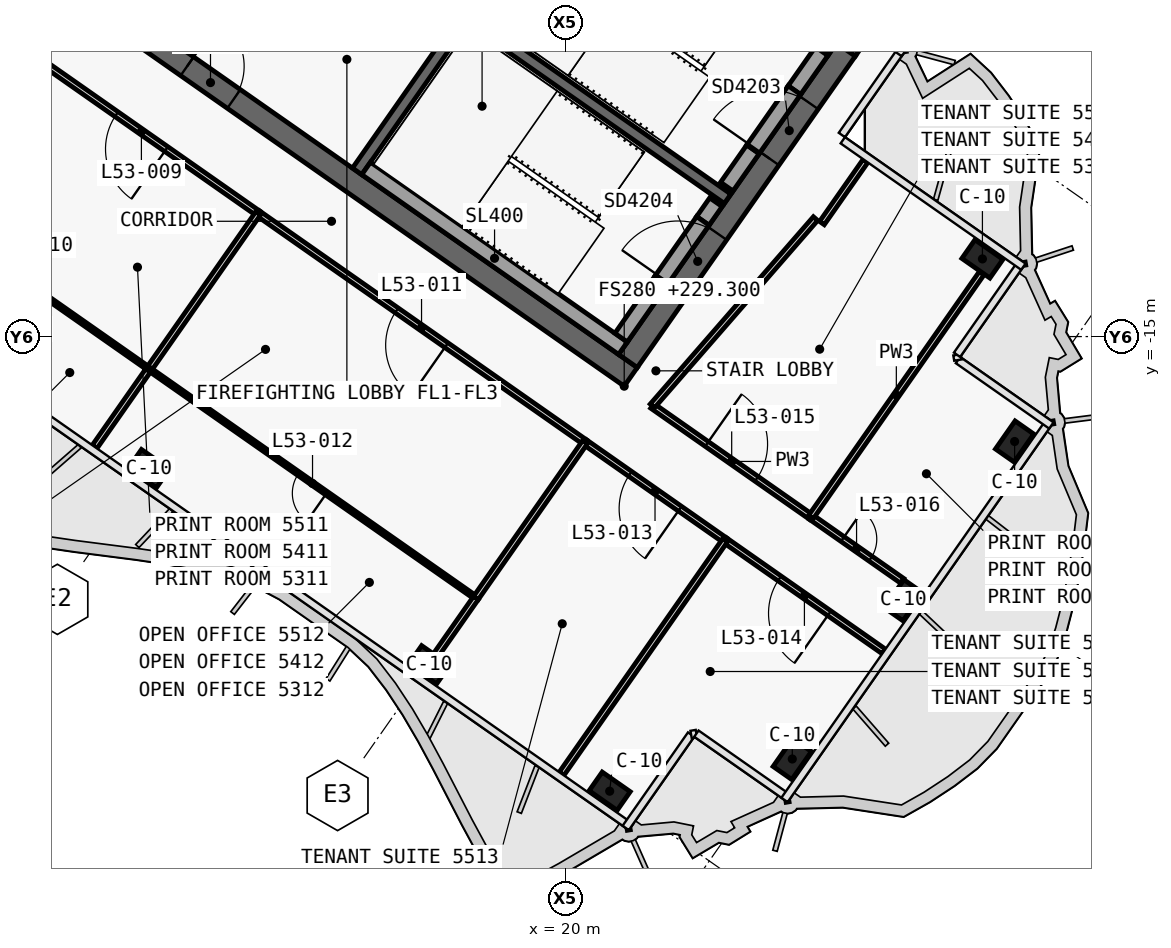
"""IFC4 building model, lengths in metres.
Left out: names, types, materials, properties, quantities, classifications, styles, units other than length and angle.
Written with IfcOpenShell. Run it as: python <this file> out.ifc"""

import sys

from ifc_helpers import new_model, si_unit, direction, frame, frame_2d, origin, origin_2d, place, context, subcontext, project, spatial, polyline, rectangle, outline, extrude, element, fill, save


model = new_model("IFC4")
c1 = context("Model", 3, precision=1e-05, world=origin(), true_north=direction((0.0, 1.0)))
c2 = subcontext(c1, "Body", "Model", "MODEL_VIEW")
j1 = project(units=[si_unit("LENGTHUNIT", "METRE"), si_unit("PLANEANGLEUNIT", "RADIAN")], contexts=[c1])
p1 = place(None, origin())
s1 = spatial("IfcSite", under=j1, at=p1, CompositionType="ELEMENT")
p2 = place(p1, origin())
s2 = spatial("IfcBuilding", under=s1, at=p2, CompositionType="ELEMENT")
p3 = place(p2, frame((0.0, 0.0, 229.3)))
s3 = spatial("IfcBuildingStorey", under=s2, at=p3, CompositionType="ELEMENT", Elevation=229.3)
p4 = place(p3, frame((0.028, 12.066, 0.0), z_axis=(0.0, 0.0, 1.0), x_axis=(0.819151382952, -0.573577380837, 0.0)))
e1 = element("IfcWall", 1, at=p4, inside=s3, PredefinedType="SHEAR", context=c2, shape_type="SweptSolid", body=[
    extrude(outline(polyline([(33.898, 0.3), (0.0, 0.3), (0.42, -0.3), (33.898, -0.3), (33.898, 0.3)])), origin(), (0.0, 0.0, 1.0), 3.9),
])
p5 = place(p3, frame((0.028, -0.874, 0.0), z_axis=(0.0, 0.0, 1.0), x_axis=(0.819150035022, -0.573579305871, 0.0)))
e2 = element("IfcWall", 2, at=p5, inside=s3, PredefinedType="SHEAR", context=c2, shape_type="SweptSolid", body=[
    extrude(outline(polyline([(26.476, 0.3), (0.0, 0.3), (0.42, -0.3), (26.476, -0.3), (26.476, 0.3)])), origin(), (0.0, 0.0, 1.0), 3.9),
])
p6 = place(p5, frame((1.026, 0.0, 0.0)))
e3 = element("IfcOpeningElement", 3, at=p6, cuts=e2, PredefinedType="OPENING", context=c2, shape_type="SweptSolid", body=[
    extrude(rectangle(XDim=1.5, YDim=2.1, at=frame_2d((0.75, 1.05))), frame((0.0, 0.31, 0.0), z_axis=(0.0, -1.0, 0.0), x_axis=(1.0, 0.0, 0.0)), (0.0, 0.0, 1.0), 0.62),
])
p7 = place(p5, frame((12.226, 0.0, 0.0)))
e4 = element("IfcOpeningElement", 4, at=p7, cuts=e2, PredefinedType="OPENING", context=c2, shape_type="SweptSolid", body=[
    extrude(rectangle(XDim=1.5, YDim=2.1, at=frame_2d((0.75, 1.05))), frame((0.0, 0.31, 0.0), z_axis=(0.0, -1.0, 0.0), x_axis=(1.0, 0.0, 0.0)), (0.0, 0.0, 1.0), 0.62),
])
p8 = place(p3, frame((21.642, -15.642, 0.0), z_axis=(0.0, 0.0, 1.0), x_axis=(0.573586866468, 0.819144740944, 0.0)))
e5 = element("IfcWall", 5, at=p8, inside=s3, PredefinedType="SHEAR", context=c2, shape_type="SweptSolid", body=[
    extrude(outline(polyline([(10.0, 0.3), (0.0, 0.3), (0.0, -0.3), (10.0, -0.3), (10.0, 0.3)])), origin(), (0.0, 0.0, 1.0), 3.9),
])
p9 = place(p8, frame((6.5, 0.0, 0.0)))
e6 = element("IfcOpeningElement", 6, at=p9, cuts=e5, PredefinedType="OPENING", context=c2, shape_type="SweptSolid", body=[
    extrude(rectangle(XDim=1.8, YDim=2.1, at=frame_2d((0.9, 1.05))), frame((0.0, 0.31, 0.0), z_axis=(0.0, -1.0, 0.0), x_axis=(1.0, 0.0, 0.0)), (0.0, 0.0, 1.0), 0.62),
])
p10 = place(p8, frame((2.3, 0.0, 0.0)))
e7 = element("IfcOpeningElement", 7, at=p10, cuts=e5, PredefinedType="OPENING", context=c2, shape_type="SweptSolid", body=[
    extrude(rectangle(XDim=1.8, YDim=2.1, at=frame_2d((0.9, 1.05))), frame((0.0, 0.31, 0.0), z_axis=(0.0, -1.0, 0.0), x_axis=(1.0, 0.0, 0.0)), (0.0, 0.0, 1.0), 0.62),
])
p11 = place(p3, frame((14.515, -10.652, 0.0), z_axis=(0.0, 0.0, 1.0), x_axis=(0.573560315113, 0.819163332265, 0.0)))
e8 = element("IfcWall", 8, at=p11, inside=s3, PredefinedType="SHEAR", context=c2, shape_type="SweptSolid", body=[
    extrude(outline(polyline([(0.0, 0.15), (0.0, -0.15), (4.85, -0.15), (4.85, 0.15), (0.0, 0.15)])), origin(), (0.0, 0.0, 1.0), 3.9),
])
p12 = place(p3, frame((2.638, 3.768, 0.0), z_axis=(0.0, 0.0, 1.0), x_axis=(0.819155014212, -0.573572194837, 0.0)))
e9 = element("IfcWall", 9, at=p12, inside=s3, PredefinedType="SHEAR", context=c2, shape_type="SweptSolid", body=[
    extrude(outline(polyline([(0.0, 0.15), (0.0, -0.15), (26.4, -0.15), (26.4, 0.15), (0.0, 0.15)])), origin(), (0.0, 0.0, 1.0), 3.9),
])
p13 = place(p12, frame((9.637, 0.0, 0.0)))
e10 = element("IfcOpeningElement", 10, at=p13, cuts=e9, PredefinedType="OPENING", context=c2, shape_type="SweptSolid", body=[
    extrude(rectangle(XDim=1.2, YDim=2.1, at=frame_2d((0.6, 1.05))), frame((0.0, 0.16, 0.0), z_axis=(0.0, -1.0, 0.0), x_axis=(1.0, 0.0, 0.0)), (0.0, 0.0, 1.0), 0.32),
])
p14 = place(p12, frame((11.812, 0.0, 0.0)))
e11 = element("IfcOpeningElement", 11, at=p14, cuts=e9, PredefinedType="OPENING", context=c2, shape_type="SweptSolid", body=[
    extrude(rectangle(XDim=1.2, YDim=2.1, at=frame_2d((0.6, 1.05))), frame((0.0, 0.16, 0.0), z_axis=(0.0, -1.0, 0.0), x_axis=(1.0, 0.0, 0.0)), (0.0, 0.0, 1.0), 0.32),
])
p15 = place(p12, frame((13.988, 0.0, 0.0)))
e12 = element("IfcOpeningElement", 12, at=p15, cuts=e9, PredefinedType="OPENING", context=c2, shape_type="SweptSolid", body=[
    extrude(rectangle(XDim=1.2, YDim=2.1, at=frame_2d((0.6, 1.05))), frame((0.0, 0.16, 0.0), z_axis=(0.0, -1.0, 0.0), x_axis=(1.0, 0.0, 0.0)), (0.0, 0.0, 1.0), 0.32),
])
p16 = place(p12, frame((16.262, 0.0, 0.0)))
e13 = element("IfcOpeningElement", 13, at=p16, cuts=e9, PredefinedType="OPENING", context=c2, shape_type="SweptSolid", body=[
    extrude(rectangle(XDim=1.0, YDim=2.1, at=frame_2d((0.5, 1.05))), frame((0.0, 0.16, 0.0), z_axis=(0.0, -1.0, 0.0), x_axis=(1.0, 0.0, 0.0)), (0.0, 0.0, 1.0), 0.32),
])
for number, where, z_axis, x_axis in (
    (14, (9.038, -18.475, 0.0), (0.0, 0.0, 1.0), (0.819, -0.574, 0.0)),
    (15, (16.41, -23.637, 0.0), (0.0, 0.0, 1.0), (0.819, -0.574, 0.0)),
    (16, (21.161, -26.964, 0.0), (0.0, 0.0, 1.0), (0.819, -0.574, 0.0)),
    (17, (30.969, -12.956, 0.0), (0.0, 0.0, 1.0), (0.819, -0.574, 0.0)),
    (18, (25.966, -26.117, 0.0), (0.0, 0.0, 1.0), (0.574, 0.819, 0.0)),
    (19, (28.891, -21.939, 0.0), (0.0, 0.0, 1.0), (0.574, 0.819, 0.0)),
    (20, (31.816, -17.761, 0.0), (0.0, 0.0, 1.0), (0.574, 0.819, 0.0)),
):
    element("IfcColumn", number, at=place(p3, frame(where, z_axis=z_axis, x_axis=x_axis)), inside=s3, PredefinedType="COLUMN", context=c2, shape_type="SweptSolid", body=[
        extrude(rectangle(XDim=0.9, YDim=0.6, at=origin_2d()), origin(), (0.0, 0.0, 1.0), 3.9),
    ])
p17 = place(p3, frame((20.259, -2.71, 0.0), z_axis=(0.0, 0.0, 1.0), x_axis=(0.81914849389, -0.573581506813, 0.0)))
e21 = element("IfcWall", 21, at=p17, inside=s3, PredefinedType="SOLIDWALL", context=c2, shape_type="SweptSolid", body=[
    extrude(rectangle(XDim=8.25, YDim=0.4, at=frame_2d((4.125, 0.0))), origin(), (0.0, 0.0, 1.0), 3.62),
])
p18 = place(p3, frame((24.244, -11.055, 0.0), z_axis=(0.0, 0.0, 1.0), x_axis=(0.573571582932, 0.819155442668, 0.0)))
e22 = element("IfcWall", 22, at=p18, inside=s3, PredefinedType="SOLIDWALL", context=c2, shape_type="SweptSolid", body=[
    extrude(rectangle(XDim=1.2, YDim=0.4, at=frame_2d((0.6, 0.0))), origin(), (0.0, 0.0, 1.0), 3.62),
])
p19 = place(p3, frame((26.022, -8.515, 0.0), z_axis=(0.0, 0.0, 1.0), x_axis=(0.573619628835, 0.819121798889, 0.0)))
e23 = element("IfcWall", 23, at=p19, inside=s3, PredefinedType="SOLIDWALL", context=c2, shape_type="SweptSolid", body=[
    extrude(rectangle(XDim=1.25, YDim=0.4, at=frame_2d((0.625, 0.0))), origin(), (0.0, 0.0, 1.0), 3.62),
])
p20 = place(p3, frame((24.932, -10.072, 2.15), z_axis=(0.0, 0.0, 1.0), x_axis=(0.573591692345, 0.819141361715, 0.0)))
e24 = element("IfcWall", 24, at=p20, inside=s3, PredefinedType="SOLIDWALL", context=c2, shape_type="SweptSolid", body=[
    extrude(rectangle(XDim=1.9, YDim=0.4, at=frame_2d((0.95, 0.0))), origin(), (0.0, 0.0, 1.0), 1.47),
])
p21 = place(p3, frame((14.753, -10.574, 0.0), z_axis=(0.0, 0.0, 1.0), x_axis=(0.819158229677, -0.573567602601, 0.0)))
e25 = element("IfcWall", 25, at=p21, inside=s3, PredefinedType="SOLIDWALL", context=c2, shape_type="SweptSolid", body=[
    extrude(rectangle(XDim=8.25, YDim=0.4, at=frame_2d((4.125, 0.0))), origin(), (0.0, 0.0, 1.0), 3.62),
])
p22 = place(p3, frame((21.462, -15.028, 0.0), z_axis=(0.0, 0.0, 1.0), x_axis=(0.573559770908, 0.819163713305, 0.0)))
e26 = element("IfcWall", 26, at=p22, inside=s3, PredefinedType="SOLIDWALL", context=c2, shape_type="SweptSolid", body=[
    extrude(rectangle(XDim=1.85, YDim=0.4, at=frame_2d((0.925, 0.0))), origin(), (0.0, 0.0, 1.0), 3.62),
])
p23 = place(p3, frame((23.613, -11.956, 0.0), z_axis=(0.0, 0.0, 1.0), x_axis=(0.573435029941, 0.819251039936, 0.0)))
e27 = element("IfcWall", 27, at=p23, inside=s3, PredefinedType="SOLIDWALL", context=c2, shape_type="SweptSolid", body=[
    extrude(rectangle(XDim=0.6, YDim=0.4, at=frame_2d((0.3, 0.0))), origin(), (0.0, 0.0, 1.0), 3.62),
])
p24 = place(p3, frame((22.523, -13.512, 2.15), z_axis=(0.0, 0.0, 1.0), x_axis=(0.573591692345, 0.819141361715, 0.0)))
e28 = element("IfcWall", 28, at=p24, inside=s3, PredefinedType="SOLIDWALL", context=c2, shape_type="SweptSolid", body=[
    extrude(rectangle(XDim=1.9, YDim=0.4, at=frame_2d((0.95, 0.0))), origin(), (0.0, 0.0, 1.0), 1.47),
])
p25 = place(p3, frame((22.283, -16.824, 0.0), z_axis=(0.0, 0.0, 1.0), x_axis=(0.819171182807, -0.573549102744, 0.0)))
e29 = element("IfcWall", 29, at=p25, inside=s3, PredefinedType="PARTITIONING", context=c2, shape_type="SweptSolid", body=[
    extrude(rectangle(XDim=5.099, YDim=0.15, at=frame_2d((2.55, 0.0))), origin(), (0.0, 0.0, 1.0), 3.05),
])
p26 = place(p25, frame((1.75, 0.0, 0.0)))
e30 = element("IfcOpeningElement", 30, at=p26, cuts=e29, PredefinedType="OPENING", context=c2, shape_type="SweptSolid", body=[
    extrude(rectangle(XDim=1.6, YDim=2.1, at=frame_2d((0.8, 1.05))), frame((0.0, 0.085, 0.0), z_axis=(0.0, -1.0, 0.0), x_axis=(1.0, 0.0, 0.0)), (0.0, 0.0, 1.0), 0.17),
])
p27 = place(p3, frame((26.457, -19.746, 0.0), z_axis=(0.0, 0.0, 1.0), x_axis=(0.819177150809, -0.573540578855, 0.0)))
e31 = element("IfcWall", 31, at=p27, inside=s3, PredefinedType="PARTITIONING", context=c2, shape_type="SweptSolid", body=[
    extrude(rectangle(XDim=2.932, YDim=0.15, at=frame_2d((1.466, 0.0))), origin(), (0.0, 0.0, 1.0), 3.05),
])
p28 = place(p27, frame((1.016, 0.0, 0.0)))
e32 = element("IfcOpeningElement", 32, at=p28, cuts=e31, PredefinedType="OPENING", context=c2, shape_type="SweptSolid", body=[
    extrude(rectangle(XDim=0.9, YDim=2.1, at=frame_2d((0.45, 1.05))), frame((0.0, 0.085, 0.0), z_axis=(0.0, -1.0, 0.0), x_axis=(1.0, 0.0, 0.0)), (0.0, 0.0, 1.0), 0.17),
])
p29 = place(p3, frame((11.912, -11.759, 0.0), z_axis=(0.0, 0.0, 1.0), x_axis=(-0.819150881364, 0.573578097177, 0.0)))
e33 = element("IfcWall", 33, at=p29, inside=s3, PredefinedType="PARTITIONING", context=c2, shape_type="SweptSolid", body=[
    extrude(rectangle(XDim=7.502, YDim=0.15, at=frame_2d((3.751, 0.0))), origin(), (0.0, 0.0, 1.0), 3.05),
])
p30 = place(p29, frame((2.951, 0.0, 0.0)))
e34 = element("IfcOpeningElement", 34, at=p30, cuts=e33, PredefinedType="OPENING", context=c2, shape_type="SweptSolid", body=[
    extrude(rectangle(XDim=1.6, YDim=2.1, at=frame_2d((0.8, 1.05))), frame((0.0, 0.085, 0.0), z_axis=(0.0, -1.0, 0.0), x_axis=(1.0, 0.0, 0.0)), (0.0, 0.0, 1.0), 0.17),
])
p31 = place(p3, frame((20.513, -17.781, 0.0), z_axis=(0.0, 0.0, 1.0), x_axis=(-0.819156568366, 0.573569975245, 0.0)))
e35 = element("IfcWall", 35, at=p31, inside=s3, PredefinedType="PARTITIONING", context=c2, shape_type="SweptSolid", body=[
    extrude(rectangle(XDim=10.504, YDim=0.15, at=frame_2d((5.252, 0.0))), origin(), (0.0, 0.0, 1.0), 3.05),
])
p32 = place(p31, frame((4.452, 0.0, 0.0)))
e36 = element("IfcOpeningElement", 36, at=p32, cuts=e35, PredefinedType="OPENING", context=c2, shape_type="SweptSolid", body=[
    extrude(rectangle(XDim=1.6, YDim=2.1, at=frame_2d((0.8, 1.05))), frame((0.0, 0.085, 0.0), z_axis=(0.0, -1.0, 0.0), x_axis=(1.0, 0.0, 0.0)), (0.0, 0.0, 1.0), 0.17),
])
p33 = place(p3, frame((24.199, -20.362, 0.0), z_axis=(0.0, 0.0, 1.0), x_axis=(-0.819165703328, 0.573556928727, 0.0)))
e37 = element("IfcWall", 37, at=p33, inside=s3, PredefinedType="PARTITIONING", context=c2, shape_type="SweptSolid", body=[
    extrude(rectangle(XDim=4.504, YDim=0.15, at=frame_2d((2.252, 0.0))), origin(), (0.0, 0.0, 1.0), 3.05),
])
p34 = place(p33, frame((1.452, 0.0, 0.0)))
e38 = element("IfcOpeningElement", 38, at=p34, cuts=e37, PredefinedType="OPENING", context=c2, shape_type="SweptSolid", body=[
    extrude(rectangle(XDim=1.6, YDim=2.1, at=frame_2d((0.8, 1.05))), frame((0.0, 0.085, 0.0), z_axis=(0.0, -1.0, 0.0), x_axis=(1.0, 0.0, 0.0)), (0.0, 0.0, 1.0), 0.17),
])
p35 = place(p3, frame((28.375, -23.287, 0.0), z_axis=(0.0, 0.0, 1.0), x_axis=(-0.819132992492, 0.573603644176, 0.0)))
e39 = element("IfcWall", 39, at=p35, inside=s3, PredefinedType="PARTITIONING", context=c2, shape_type="SweptSolid", body=[
    extrude(rectangle(XDim=5.102, YDim=0.15, at=frame_2d((2.551, 0.0))), origin(), (0.0, 0.0, 1.0), 3.0),
])
p36 = place(p35, frame((1.751, 0.0, 0.0)))
e40 = element("IfcOpeningElement", 40, at=p36, cuts=e39, PredefinedType="OPENING", context=c2, shape_type="SweptSolid", body=[
    extrude(rectangle(XDim=1.6, YDim=2.1, at=frame_2d((0.8, 1.05))), frame((0.0, 0.085, 0.0), z_axis=(0.0, -1.0, 0.0), x_axis=(1.0, 0.0, 0.0)), (0.0, 0.0, 1.0), 0.17),
])
p37 = place(p3, frame((30.949, -13.333, 0.0), z_axis=(0.0, 0.0, 1.0), x_axis=(-0.573558601227, -0.819164532288, 0.0)))
e41 = element("IfcWall", 41, at=p37, inside=s3, PredefinedType="PARTITIONING", context=c2, shape_type="SweptSolid", body=[
    extrude(rectangle(XDim=7.83, YDim=0.15, at=frame_2d((3.915, 0.0))), origin(), (0.0, 0.0, 1.0), 3.0),
])
p38 = place(p3, frame((22.285, -16.825, 0.0), z_axis=(0.0, 0.0, 1.0), x_axis=(0.656781429942, 0.754080999153, 0.0)))
e42 = element("IfcWall", 42, at=p38, inside=s3, PredefinedType="PARTITIONING", context=c2, shape_type="SweptSolid", body=[
    extrude(rectangle(XDim=6.536, YDim=0.15, at=frame_2d((3.268, 0.0))), origin(), (0.0, 0.0, 1.0), 3.62),
])
p39 = place(p3, frame((26.746, -12.014, 0.0), z_axis=(0.0, 0.0, 1.0), x_axis=(0.573568836472, 0.819157365729, 0.0)))
e43 = element("IfcWall", 43, at=p39, inside=s3, PredefinedType="PARTITIONING", context=c2, shape_type="SweptSolid", body=[
    extrude(rectangle(XDim=2.0, YDim=0.15, at=frame_2d((1.0, 0.0))), origin(), (0.0, 0.0, 1.0), 3.05),
])
p40 = place(p3, frame((9.042, -15.854, 0.0), z_axis=(0.0, 0.0, 1.0), x_axis=(-0.81915238829, 0.573575945067, 0.0)))
e44 = element("IfcWall", 44, at=p40, inside=s3, PredefinedType="PARTITIONING", context=c2, shape_type="SweptSolid", body=[
    extrude(rectangle(XDim=7.5, YDim=0.1, at=frame_2d((3.75, 0.0))), origin(), (0.0, 0.0, 1.0), 3.05),
])
p41 = place(p40, frame((3.3, 0.0, 0.0)))
e45 = element("IfcOpeningElement", 45, at=p41, cuts=e44, PredefinedType="OPENING", context=c2, shape_type="SweptSolid", body=[
    extrude(rectangle(XDim=0.9, YDim=2.1, at=frame_2d((0.45, 1.05))), frame((0.0, 0.06, 0.0), z_axis=(0.0, -1.0, 0.0), x_axis=(1.0, 0.0, 0.0)), (0.0, 0.0, 1.0), 0.12),
])
p42 = place(p3, frame((9.042, -15.854, 0.0), z_axis=(0.0, 0.0, 1.0), x_axis=(-0.573560689761, -0.819163069945, 0.0)))
e46 = element("IfcWall", 46, at=p42, inside=s3, PredefinedType="PARTITIONING", context=c2, shape_type="SweptSolid", body=[
    extrude(rectangle(XDim=2.499, YDim=0.15, at=frame_2d((1.25, 0.0))), origin(), (0.0, 0.0, 1.0), 3.0),
])
p43 = place(p3, frame((11.91, -11.758, 0.0), z_axis=(0.0, 0.0, 1.0), x_axis=(-0.573563925118, -0.819160804606, 0.0)))
e47 = element("IfcWall", 47, at=p43, inside=s3, PredefinedType="PARTITIONING", context=c2, shape_type="SweptSolid", body=[
    extrude(rectangle(XDim=5.0, YDim=0.15, at=frame_2d((2.5, 0.0))), origin(), (0.0, 0.0, 1.0), 3.62),
])
p44 = place(p3, frame((17.643, -21.877, 0.0), z_axis=(0.0, 0.0, 1.0), x_axis=(-0.819155448096, 0.573571575181, 0.0)))
e48 = element("IfcWall", 48, at=p44, inside=s3, PredefinedType="PARTITIONING", context=c2, shape_type="SweptSolid", body=[
    extrude(rectangle(XDim=10.5, YDim=0.1, at=frame_2d((5.25, 0.0))), origin(), (0.0, 0.0, 1.0), 3.05),
])
p45 = place(p44, frame((4.8, 0.0, 0.0)))
e49 = element("IfcOpeningElement", 49, at=p45, cuts=e48, PredefinedType="OPENING", context=c2, shape_type="SweptSolid", body=[
    extrude(rectangle(XDim=0.9, YDim=2.1, at=frame_2d((0.45, 1.05))), frame((0.0, 0.06, 0.0), z_axis=(0.0, -1.0, 0.0), x_axis=(1.0, 0.0, 0.0)), (0.0, 0.0, 1.0), 0.12),
])
p46 = place(p3, frame((17.643, -21.877, 0.0), z_axis=(0.0, 0.0, 1.0), x_axis=(-0.573560882037, -0.819162935317, 0.0)))
e50 = element("IfcWall", 50, at=p46, inside=s3, PredefinedType="PARTITIONING", context=c2, shape_type="SweptSolid", body=[
    extrude(rectangle(XDim=1.829, YDim=0.15, at=frame_2d((0.915, 0.0))), origin(), (0.0, 0.0, 1.0), 3.05),
])
p47 = place(p3, frame((20.511, -17.78, 0.0), z_axis=(0.0, 0.0, 1.0), x_axis=(-0.573554101347, -0.819167682973, 0.0)))
e51 = element("IfcWall", 51, at=p47, inside=s3, PredefinedType="PARTITIONING", context=c2, shape_type="SweptSolid", body=[
    extrude(rectangle(XDim=5.0, YDim=0.15, at=frame_2d((2.5, 0.0))), origin(), (0.0, 0.0, 1.0), 3.05),
])
p48 = place(p3, frame((24.197, -20.361, 0.0), z_axis=(0.0, 0.0, 1.0), x_axis=(-0.573575945067, -0.81915238829, 0.0)))
e52 = element("IfcWall", 52, at=p48, inside=s3, PredefinedType="PARTITIONING", context=c2, shape_type="SweptSolid", body=[
    extrude(rectangle(XDim=7.5, YDim=0.15, at=frame_2d((3.75, 0.0))), origin(), (0.0, 0.0, 1.0), 3.0),
])
p49 = place(p7, origin())
e53 = element("IfcDoor", 53, at=p49, inside=s3, OperationType="DOUBLE_DOOR_SINGLE_SWING", PredefinedType="DOOR", context=c2, shape_type="SweptSolid", body=[
    extrude(rectangle(XDim=1.5, YDim=2.1, at=frame_2d((0.75, 1.05))), frame((0.0, 0.025, 0.0), z_axis=(0.0, -1.0, 0.0), x_axis=(1.0, 0.0, 0.0)), (0.0, 0.0, 1.0), 0.05),
])
fill(e4, e53)
p50 = place(p9, origin())
e54 = element("IfcDoor", 54, at=p50, inside=s3, OperationType="DOUBLE_DOOR_SINGLE_SWING", PredefinedType="DOOR", context=c2, shape_type="SweptSolid", body=[
    extrude(rectangle(XDim=1.8, YDim=2.1, at=frame_2d((0.9, 1.05))), frame((0.0, 0.025, 0.0), z_axis=(0.0, -1.0, 0.0), x_axis=(1.0, 0.0, 0.0)), (0.0, 0.0, 1.0), 0.05),
])
fill(e6, e54)
p51 = place(p10, origin())
e55 = element("IfcDoor", 55, at=p51, inside=s3, OperationType="DOUBLE_DOOR_SINGLE_SWING", PredefinedType="DOOR", context=c2, shape_type="SweptSolid", body=[
    extrude(rectangle(XDim=1.8, YDim=2.1, at=frame_2d((0.9, 1.05))), frame((0.0, 0.025, 0.0), z_axis=(0.0, -1.0, 0.0), x_axis=(1.0, 0.0, 0.0)), (0.0, 0.0, 1.0), 0.05),
])
fill(e7, e55)
p52 = place(p30, origin())
e56 = element("IfcDoor", 56, at=p52, inside=s3, OperationType="DOUBLE_DOOR_SINGLE_SWING", PredefinedType="DOOR", context=c2, shape_type="SweptSolid", body=[
    extrude(rectangle(XDim=1.6, YDim=2.1, at=frame_2d((0.8, 1.05))), frame((0.0, 0.025, 0.0), z_axis=(0.0, -1.0, 0.0), x_axis=(1.0, 0.0, 0.0)), (0.0, 0.0, 1.0), 0.05),
])
fill(e34, e56)
p53 = place(p32, origin())
e57 = element("IfcDoor", 57, at=p53, inside=s3, OperationType="DOUBLE_DOOR_SINGLE_SWING", PredefinedType="DOOR", context=c2, shape_type="SweptSolid", body=[
    extrude(rectangle(XDim=1.6, YDim=2.1, at=frame_2d((0.8, 1.05))), frame((0.0, 0.025, 0.0), z_axis=(0.0, -1.0, 0.0), x_axis=(1.0, 0.0, 0.0)), (0.0, 0.0, 1.0), 0.05),
])
fill(e36, e57)
p54 = place(p45, origin())
e58 = element("IfcDoor", 58, at=p54, inside=s3, OperationType="SINGLE_SWING_LEFT", PredefinedType="DOOR", context=c2, shape_type="SweptSolid", body=[
    extrude(rectangle(XDim=0.9, YDim=2.1, at=frame_2d((0.45, 1.05))), frame((0.0, 0.025, 0.0), z_axis=(0.0, -1.0, 0.0), x_axis=(1.0, 0.0, 0.0)), (0.0, 0.0, 1.0), 0.05),
])
fill(e49, e58)
p55 = place(p34, origin())
e59 = element("IfcDoor", 59, at=p55, inside=s3, OperationType="DOUBLE_DOOR_SINGLE_SWING", PredefinedType="DOOR", context=c2, shape_type="SweptSolid", body=[
    extrude(rectangle(XDim=1.6, YDim=2.1, at=frame_2d((0.8, 1.05))), frame((0.0, 0.025, 0.0), z_axis=(0.0, -1.0, 0.0), x_axis=(1.0, 0.0, 0.0)), (0.0, 0.0, 1.0), 0.05),
])
fill(e38, e59)
p56 = place(p36, origin())
e60 = element("IfcDoor", 60, at=p56, inside=s3, OperationType="DOUBLE_DOOR_SINGLE_SWING", PredefinedType="DOOR", context=c2, shape_type="SweptSolid", body=[
    extrude(rectangle(XDim=1.6, YDim=2.1, at=frame_2d((0.8, 1.05))), frame((0.0, 0.025, 0.0), z_axis=(0.0, -1.0, 0.0), x_axis=(1.0, 0.0, 0.0)), (0.0, 0.0, 1.0), 0.05),
])
fill(e40, e60)
p57 = place(p26, origin())
e61 = element("IfcDoor", 61, at=p57, inside=s3, OperationType="DOUBLE_DOOR_SINGLE_SWING", PredefinedType="DOOR", context=c2, shape_type="SweptSolid", body=[
    extrude(rectangle(XDim=1.6, YDim=2.1, at=frame_2d((0.8, 1.05))), frame((0.0, 0.025, 0.0), z_axis=(0.0, -1.0, 0.0), x_axis=(1.0, 0.0, 0.0)), (0.0, 0.0, 1.0), 0.05),
])
fill(e30, e61)
p58 = place(p28, origin())
e62 = element("IfcDoor", 62, at=p58, inside=s3, OperationType="SINGLE_SWING_LEFT", PredefinedType="DOOR", context=c2, shape_type="SweptSolid", body=[
    extrude(rectangle(XDim=0.9, YDim=2.1, at=frame_2d((0.45, 1.05))), frame((0.0, 0.025, 0.0), z_axis=(0.0, -1.0, 0.0), x_axis=(1.0, 0.0, 0.0)), (0.0, 0.0, 1.0), 0.05),
])
fill(e32, e62)
save(model, sys.argv[1])
